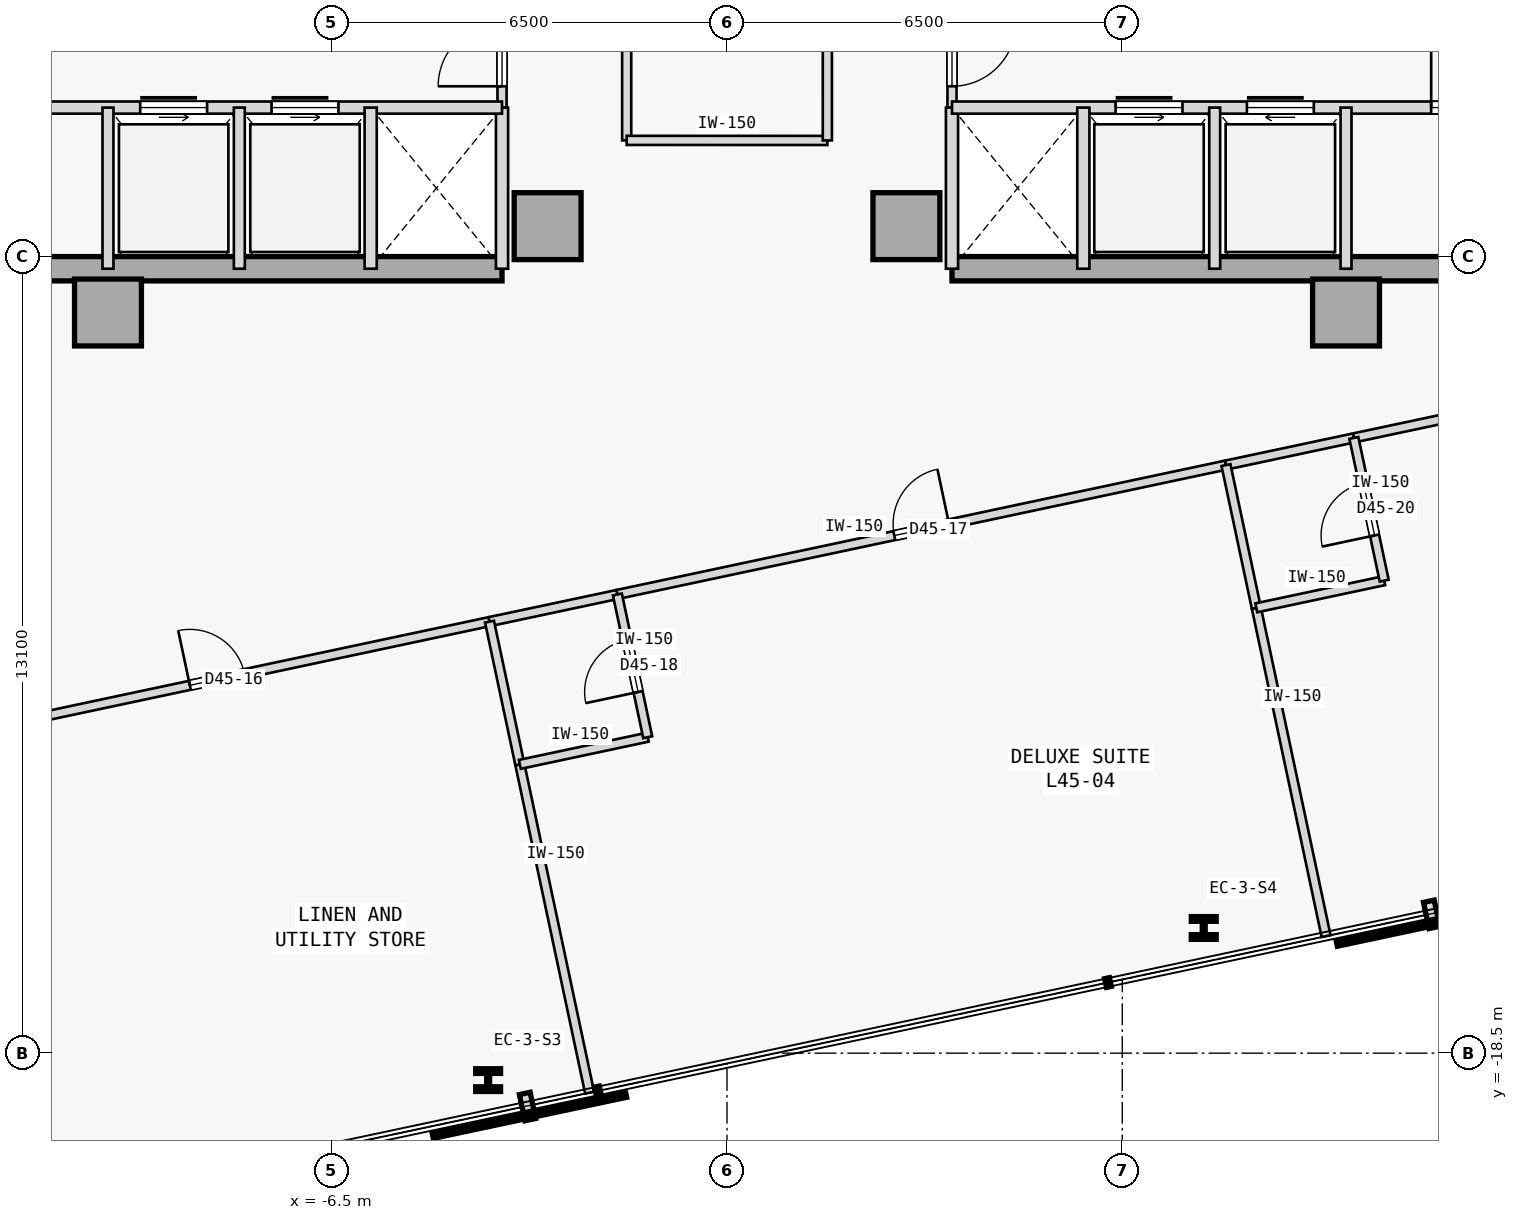
"""IFC4 building model, lengths in metres.
Left out: names, types, materials, properties, quantities, classifications, styles, units other than length and angle.
Written with IfcOpenShell. Run it as: python <this file> out.ifc"""

import sys

from ifc_helpers import new_model, si_unit, direction, frame, frame_2d, origin, origin_2d, place, context, subcontext, project, spatial, rectangle, i_section, extrude, element, fill, save


model = new_model("IFC4")
c1 = context("Model", 3, precision=1e-05, world=origin(), true_north=direction((0.0, 1.0)))
c2 = subcontext(c1, "Body", "Model", "MODEL_VIEW")
j1 = project(units=[si_unit("LENGTHUNIT", "METRE"), si_unit("PLANEANGLEUNIT", "RADIAN")], contexts=[c1])
p1 = place(None, origin())
s1 = spatial("IfcSite", under=j1, at=p1, CompositionType="ELEMENT")
p2 = place(p1, origin())
s2 = spatial("IfcBuilding", under=s1, at=p2, CompositionType="ELEMENT")
p3 = place(p2, frame((0.0, 0.0, 175.2)))
s3 = spatial("IfcBuildingStorey", under=s2, at=p3, CompositionType="ELEMENT", Elevation=175.2)
for number, where, z_axis, x_axis in (
    (1, (-10.18, -6.32, 0.0), (0.0, 0.0, 1.0), (1.0, 0.0, 0.0)),
    (2, (-2.95, -4.9, 0.0), (0.0, 0.0, 1.0), (1.0, 0.0, 0.0)),
    (3, (10.18, -6.32, 0.0), (0.0, 0.0, 1.0), (1.0, 0.0, 0.0)),
    (4, (2.95, -4.9, 0.0), (0.0, 0.0, 1.0), (1.0, 0.0, 0.0)),
):
    element("IfcColumn", number, at=place(p3, frame(where, z_axis=z_axis, x_axis=x_axis)), inside=s3, PredefinedType="COLUMN", context=c2, shape_type="SweptSolid", body=[
        extrude(rectangle(XDim=1.1, YDim=1.1, at=origin_2d()), origin(), (0.0, 0.0, 1.0), 3.4),
    ])
for number, where, z_axis, x_axis in (
    (5, (-14.56, -5.6, 0.0), (0.0, 0.0, 1.0), (1.0, 0.0, 0.0)),
    (6, (3.7, -5.6, 0.0), (0.0, 0.0, 1.0), (1.0, 0.0, 0.0)),
):
    element("IfcWall", number, at=place(p3, frame(where, z_axis=z_axis, x_axis=x_axis)), inside=s3, PredefinedType="SHEAR", context=c2, shape_type="SweptSolid", body=[
        extrude(rectangle(XDim=10.86, YDim=0.4, at=frame_2d((5.43, 0.0))), origin(), (0.0, 0.0, 1.0), 3.175),
    ])
for number, where, z_axis, x_axis in (
    (7, (-3.928, -18.943, 0.0), (0.0, 0.0, 1.0), (1.0, 0.0, 0.0)),
    (8, (7.84, -16.441, 0.0), (0.0, 0.0, 1.0), (1.0, 0.0, 0.0)),
):
    element("IfcColumn", number, at=place(p3, frame(where, z_axis=z_axis, x_axis=x_axis)), inside=s3, PredefinedType="COLUMN", context=c2, shape_type="SweptSolid", body=[
        extrude(i_section(OverallWidth=0.409, OverallDepth=0.374, WebThickness=0.048, FlangeThickness=0.077, FilletRadius=0.015, at=origin_2d()), origin(), (0.0, 0.0, 1.0), 3.4),
    ])
p4 = place(p3, frame((-3.7, -2.95, 0.0), z_axis=(0.0, 0.0, 1.0), x_axis=(0.0, 1.0, 0.0)))
e9 = element("IfcWall", 9, at=p4, inside=s3, PredefinedType="PARTITIONING", context=c2, shape_type="SweptSolid", body=[
    extrude(rectangle(XDim=1.8, YDim=0.15, at=frame_2d((0.9, 0.0))), origin(), (0.0, 0.0, 1.0), 3.175),
])
p5 = place(p4, frame((0.35, 0.0, 0.0)))
e10 = element("IfcOpeningElement", 10, at=p5, cuts=e9, PredefinedType="OPENING", context=c2, shape_type="SweptSolid", body=[
    extrude(rectangle(XDim=1.05, YDim=2.18, at=frame_2d((0.525, 1.09))), frame((0.0, 0.085, 0.0), z_axis=(0.0, -1.0, 0.0), x_axis=(1.0, 0.0, 0.0)), (0.0, 0.0, 1.0), 0.17),
])
p6 = place(p3, frame((-3.7, -5.6, 0.0), z_axis=(0.0, 0.0, 1.0), x_axis=(0.0, 1.0, 0.0)))
e11 = element("IfcWall", 11, at=p6, inside=s3, PredefinedType="STANDARD", context=c2, shape_type="SweptSolid", body=[
    extrude(rectangle(XDim=2.65, YDim=0.2, at=frame_2d((1.325, 0.0))), origin(), (0.0, 0.0, 1.0), 3.175),
])
p7 = place(p3, frame((-14.5, -2.95, 0.0), z_axis=(0.0, 0.0, 1.0), x_axis=(1.0, 0.0, 0.0)))
e12 = element("IfcWall", 12, at=p7, inside=s3, PredefinedType="STANDARD", context=c2, shape_type="SweptSolid", body=[
    extrude(rectangle(XDim=10.8, YDim=0.2, at=frame_2d((5.4, 0.0))), origin(), (0.0, 0.0, 1.0), 3.175),
])
p8 = place(p7, frame((4.85, 0.0, 0.0)))
e13 = element("IfcOpeningElement", 13, at=p8, cuts=e12, PredefinedType="OPENING", context=c2, shape_type="SweptSolid", body=[
    extrude(rectangle(XDim=1.1, YDim=2.15, at=frame_2d((0.55, 1.075))), frame((0.0, 0.11, 0.0), z_axis=(0.0, -1.0, 0.0), x_axis=(1.0, 0.0, 0.0)), (0.0, 0.0, 1.0), 0.22),
])
p9 = place(p7, frame((7.01, 0.0, 0.0)))
e14 = element("IfcOpeningElement", 14, at=p9, cuts=e12, PredefinedType="OPENING", context=c2, shape_type="SweptSolid", body=[
    extrude(rectangle(XDim=1.1, YDim=2.15, at=frame_2d((0.55, 1.075))), frame((0.0, 0.11, 0.0), z_axis=(0.0, -1.0, 0.0), x_axis=(1.0, 0.0, 0.0)), (0.0, 0.0, 1.0), 0.22),
])
p10 = place(p7, frame((1.4, 0.0, 0.0)))
e15 = element("IfcOpeningElement", 15, at=p10, cuts=e12, PredefinedType="OPENING", context=c2, shape_type="SweptSolid", body=[
    extrude(rectangle(XDim=0.95, YDim=2.15, at=frame_2d((0.475, 1.075))), frame((0.0, 0.11, 0.0), z_axis=(0.0, -1.0, 0.0), x_axis=(1.0, 0.0, 0.0)), (0.0, 0.0, 1.0), 0.22),
])
p11 = place(p3, frame((-5.86, -5.6, 0.0), z_axis=(0.0, 0.0, 1.0), x_axis=(0.0, 1.0, 0.0)))
e16 = element("IfcWall", 16, at=p11, inside=s3, PredefinedType="STANDARD", context=c2, shape_type="SweptSolid", body=[
    extrude(rectangle(XDim=2.65, YDim=0.2, at=frame_2d((1.325, 0.0))), origin(), (0.0, 0.0, 1.0), 3.175),
])
for number, where, z_axis, x_axis in (
    (17, (-10.18, -5.6, 0.0), (0.0, 0.0, 1.0), (0.0, 1.0, 0.0)),
    (18, (-8.02, -5.6, 0.0), (0.0, 0.0, 1.0), (0.0, 1.0, 0.0)),
):
    element("IfcWall", number, at=place(p3, frame(where, z_axis=z_axis, x_axis=x_axis)), inside=s3, PredefinedType="STANDARD", context=c2, shape_type="SweptSolid", body=[
        extrude(rectangle(XDim=2.65, YDim=0.18, at=frame_2d((1.325, 0.0))), origin(), (0.0, 0.0, 1.0), 3.175),
    ])
p12 = place(p3, frame((3.7, -2.95, 0.0), z_axis=(0.0, 0.0, 1.0), x_axis=(0.0, 1.0, 0.0)))
e19 = element("IfcWall", 19, at=p12, inside=s3, PredefinedType="PARTITIONING", context=c2, shape_type="SweptSolid", body=[
    extrude(rectangle(XDim=1.8, YDim=0.15, at=frame_2d((0.9, 0.0))), origin(), (0.0, 0.0, 1.0), 3.175),
])
p13 = place(p12, frame((0.35, 0.0, 0.0)))
e20 = element("IfcOpeningElement", 20, at=p13, cuts=e19, PredefinedType="OPENING", context=c2, shape_type="SweptSolid", body=[
    extrude(rectangle(XDim=1.05, YDim=2.18, at=frame_2d((0.525, 1.09))), frame((0.0, 0.085, 0.0), z_axis=(0.0, -1.0, 0.0), x_axis=(1.0, 0.0, 0.0)), (0.0, 0.0, 1.0), 0.17),
])
p14 = place(p3, frame((3.7, -5.6, 0.0), z_axis=(0.0, 0.0, 1.0), x_axis=(0.0, 1.0, 0.0)))
e21 = element("IfcWall", 21, at=p14, inside=s3, PredefinedType="STANDARD", context=c2, shape_type="SweptSolid", body=[
    extrude(rectangle(XDim=2.65, YDim=0.2, at=frame_2d((1.325, 0.0))), origin(), (0.0, 0.0, 1.0), 3.175),
])
p15 = place(p3, frame((3.7, -2.95, 0.0), z_axis=(0.0, 0.0, 1.0), x_axis=(1.0, 0.0, 0.0)))
e22 = element("IfcWall", 22, at=p15, inside=s3, PredefinedType="STANDARD", context=c2, shape_type="SweptSolid", body=[
    extrude(rectangle(XDim=10.8, YDim=0.2, at=frame_2d((5.4, 0.0))), origin(), (0.0, 0.0, 1.0), 3.175),
])
p16 = place(p15, frame((2.69, 0.0, 0.0)))
e23 = element("IfcOpeningElement", 23, at=p16, cuts=e22, PredefinedType="OPENING", context=c2, shape_type="SweptSolid", body=[
    extrude(rectangle(XDim=1.1, YDim=2.15, at=frame_2d((0.55, 1.075))), frame((0.0, 0.11, 0.0), z_axis=(0.0, -1.0, 0.0), x_axis=(1.0, 0.0, 0.0)), (0.0, 0.0, 1.0), 0.22),
])
p17 = place(p15, frame((4.85, 0.0, 0.0)))
e24 = element("IfcOpeningElement", 24, at=p17, cuts=e22, PredefinedType="OPENING", context=c2, shape_type="SweptSolid", body=[
    extrude(rectangle(XDim=1.1, YDim=2.15, at=frame_2d((0.55, 1.075))), frame((0.0, 0.11, 0.0), z_axis=(0.0, -1.0, 0.0), x_axis=(1.0, 0.0, 0.0)), (0.0, 0.0, 1.0), 0.22),
])
p18 = place(p15, frame((7.88, 0.0, 0.0)))
e25 = element("IfcOpeningElement", 25, at=p18, cuts=e22, PredefinedType="OPENING", context=c2, shape_type="SweptSolid", body=[
    extrude(rectangle(XDim=0.95, YDim=2.15, at=frame_2d((0.475, 1.075))), frame((0.0, 0.11, 0.0), z_axis=(0.0, -1.0, 0.0), x_axis=(1.0, 0.0, 0.0)), (0.0, 0.0, 1.0), 0.22),
])
p19 = place(p3, frame((5.86, -5.6, 0.0), z_axis=(0.0, 0.0, 1.0), x_axis=(0.0, 1.0, 0.0)))
e26 = element("IfcWall", 26, at=p19, inside=s3, PredefinedType="STANDARD", context=c2, shape_type="SweptSolid", body=[
    extrude(rectangle(XDim=2.65, YDim=0.2, at=frame_2d((1.325, 0.0))), origin(), (0.0, 0.0, 1.0), 3.175),
])
for number, where, z_axis, x_axis in (
    (27, (10.18, -5.6, 0.0), (0.0, 0.0, 1.0), (0.0, 1.0, 0.0)),
    (28, (8.02, -5.6, 0.0), (0.0, 0.0, 1.0), (0.0, 1.0, 0.0)),
):
    element("IfcWall", number, at=place(p3, frame(where, z_axis=z_axis, x_axis=x_axis)), inside=s3, PredefinedType="STANDARD", context=c2, shape_type="SweptSolid", body=[
        extrude(rectangle(XDim=2.65, YDim=0.18, at=frame_2d((1.325, 0.0))), origin(), (0.0, 0.0, 1.0), 3.175),
    ])
p20 = place(p3, frame((-1.65, -3.49, 0.0), z_axis=(0.0, 0.0, 1.0), x_axis=(-3.4979712e-05, 0.999999999388, 0.0)))
e29 = element("IfcWall", 29, at=p20, inside=s3, PredefinedType="PARTITIONING", context=c2, shape_type="SweptSolid", body=[
    extrude(rectangle(XDim=6.979, YDim=0.15, at=frame_2d((3.49, 0.0))), origin(), (0.0, 0.0, 1.0), 3.175),
])
p21 = place(p3, frame((-1.65, -3.49, 0.0), z_axis=(0.0, 0.0, 1.0), x_axis=(0.999999975374, -0.000221926315, 0.0)))
e30 = element("IfcWall", 30, at=p21, inside=s3, PredefinedType="PARTITIONING", context=c2, shape_type="SweptSolid", body=[
    extrude(rectangle(XDim=3.3, YDim=0.15, at=frame_2d((1.65, 0.0))), origin(), (0.0, 0.0, 1.0), 3.175),
])
p22 = place(p3, frame((1.65, -3.49, 0.0), z_axis=(0.0, 0.0, 1.0), x_axis=(-6.9952083e-05, 0.999999997553, 0.0)))
e31 = element("IfcWall", 31, at=p22, inside=s3, PredefinedType="PARTITIONING", context=c2, shape_type="SweptSolid", body=[
    extrude(rectangle(XDim=6.98, YDim=0.15, at=frame_2d((3.49, 0.0))), origin(), (0.0, 0.0, 1.0), 3.175),
])
p23 = place(p22, frame((3.015, 0.0, 0.0)))
e32 = element("IfcOpeningElement", 32, at=p23, cuts=e31, PredefinedType="OPENING", context=c2, shape_type="SweptSolid", body=[
    extrude(rectangle(XDim=0.95, YDim=2.15, at=frame_2d((0.475, 1.075))), frame((0.0, 0.085, 0.0), z_axis=(0.0, -1.0, 0.0), x_axis=(1.0, 0.0, 0.0)), (0.0, 0.0, 1.0), 0.17),
])
p24 = place(p3, frame((-12.862, -13.307, 0.0), z_axis=(0.0, 0.0, 1.0), x_axis=(0.978149904805, 0.207900850719, 0.0)))
e33 = element("IfcWall", 33, at=p24, inside=s3, PredefinedType="PARTITIONING", context=c2, shape_type="SweptSolid", body=[
    extrude(rectangle(XDim=9.156, YDim=0.15, at=frame_2d((4.578, 0.0))), origin(), (0.0, 0.0, 1.0), 3.175),
])
p25 = place(p24, frame((4.118, 0.0, 0.0)))
e34 = element("IfcOpeningElement", 34, at=p25, cuts=e33, PredefinedType="OPENING", context=c2, shape_type="SweptSolid", body=[
    extrude(rectangle(XDim=0.92, YDim=2.15, at=frame_2d((0.46, 1.075))), frame((0.0, 0.085, 0.0), z_axis=(0.0, -1.0, 0.0), x_axis=(1.0, 0.0, 0.0)), (0.0, 0.0, 1.0), 0.17),
])
p26 = place(p3, frame((-1.803, -10.957, 0.0), z_axis=(0.0, 0.0, 1.0), x_axis=(0.978145386425, 0.207922108048, 0.0)))
e35 = element("IfcWall", 35, at=p26, inside=s3, PredefinedType="PARTITIONING", context=c2, shape_type="SweptSolid", body=[
    extrude(rectangle(XDim=10.232, YDim=0.15, at=frame_2d((5.116, 0.0))), origin(), (0.0, 0.0, 1.0), 3.175),
])
p27 = place(p26, frame((4.656, 0.0, 0.0)))
e36 = element("IfcOpeningElement", 36, at=p27, cuts=e35, PredefinedType="OPENING", context=c2, shape_type="SweptSolid", body=[
    extrude(rectangle(XDim=0.92, YDim=2.15, at=frame_2d((0.46, 1.075))), frame((0.0, 0.085, 0.0), z_axis=(0.0, -1.0, 0.0), x_axis=(1.0, 0.0, 0.0)), (0.0, 0.0, 1.0), 0.17),
])
p28 = place(p3, frame((-3.906, -11.404, 0.0), z_axis=(0.0, 0.0, 1.0), x_axis=(0.978146728319, 0.207915795165, 0.0)))
e37 = element("IfcWall", 37, at=p28, inside=s3, PredefinedType="PARTITIONING", context=c2, shape_type="SweptSolid", body=[
    extrude(rectangle(XDim=2.15, YDim=0.15, at=frame_2d((1.075, 0.0))), origin(), (0.0, 0.0, 1.0), 3.175),
])
p29 = place(p3, frame((10.309, -8.382, 0.0), z_axis=(0.0, 0.0, 1.0), x_axis=(0.978149817889, 0.207901259648, 0.0)))
e38 = element("IfcWall", 38, at=p29, inside=s3, PredefinedType="PARTITIONING", context=c2, shape_type="SweptSolid", body=[
    extrude(rectangle(XDim=7.007, YDim=0.15, at=frame_2d((3.503, 0.0))), origin(), (0.0, 0.0, 1.0), 3.175),
])
p30 = place(p29, frame((3.043, 0.0, 0.0)))
e39 = element("IfcOpeningElement", 39, at=p30, cuts=e38, PredefinedType="OPENING", context=c2, shape_type="SweptSolid", body=[
    extrude(rectangle(XDim=0.92, YDim=2.15, at=frame_2d((0.46, 1.075))), frame((0.0, 0.085, 0.0), z_axis=(0.0, -1.0, 0.0), x_axis=(1.0, 0.0, 0.0)), (0.0, 0.0, 1.0), 0.17),
])
p31 = place(p3, frame((8.206, -8.829, 0.0), z_axis=(0.0, 0.0, 1.0), x_axis=(0.978146728319, 0.207915795165, 0.0)))
e40 = element("IfcWall", 40, at=p31, inside=s3, PredefinedType="PARTITIONING", context=c2, shape_type="SweptSolid", body=[
    extrude(rectangle(XDim=2.15, YDim=0.15, at=frame_2d((1.075, 0.0))), origin(), (0.0, 0.0, 1.0), 3.175),
])
p32 = place(p3, frame((-2.259, -19.15, 0.0), z_axis=(0.0, 0.0, 1.0), x_axis=(-0.20791588359, 0.978146709523, 0.0)))
e41 = element("IfcWall", 41, at=p32, inside=s3, PredefinedType="PARTITIONING", context=c2, shape_type="SweptSolid", body=[
    extrude(rectangle(XDim=5.52, YDim=0.15, at=frame_2d((2.76, 0.0))), origin(), (0.0, 0.0, 1.0), 3.175),
])
p33 = place(p3, frame((-3.407, -13.751, 0.0), z_axis=(0.0, 0.0, 1.0), x_axis=(-0.207840504985, 0.978162729042, 0.0)))
e42 = element("IfcWall", 42, at=p33, inside=s3, PredefinedType="PARTITIONING", context=c2, shape_type="SweptSolid", body=[
    extrude(rectangle(XDim=2.4, YDim=0.15, at=frame_2d((1.2, 0.0))), origin(), (0.0, 0.0, 1.0), 3.175),
])
p34 = place(p3, frame((-3.407, -13.751, 0.0), z_axis=(0.0, 0.0, 1.0), x_axis=(0.978151636287, 0.207892704126, 0.0)))
e43 = element("IfcWall", 43, at=p34, inside=s3, PredefinedType="PARTITIONING", context=c2, shape_type="SweptSolid", body=[
    extrude(rectangle(XDim=2.15, YDim=0.15, at=frame_2d((1.075, 0.0))), origin(), (0.0, 0.0, 1.0), 3.175),
])
p35 = place(p3, frame((-1.304, -13.304, 0.0), z_axis=(0.0, 0.0, 1.0), x_axis=(-0.207937840262, 0.978142042133, 0.0)))
e44 = element("IfcWall", 44, at=p35, inside=s3, PredefinedType="PARTITIONING", context=c2, shape_type="SweptSolid", body=[
    extrude(rectangle(XDim=2.4, YDim=0.15, at=frame_2d((1.2, 0.0))), origin(), (0.0, 0.0, 1.0), 3.175),
])
p36 = place(p35, frame((0.76, 0.0, 0.0)))
e45 = element("IfcOpeningElement", 45, at=p36, cuts=e44, PredefinedType="OPENING", context=c2, shape_type="SweptSolid", body=[
    extrude(rectangle(XDim=0.88, YDim=2.15, at=frame_2d((0.44, 1.075))), frame((0.0, 0.085, 0.0), z_axis=(0.0, -1.0, 0.0), x_axis=(1.0, 0.0, 0.0)), (0.0, 0.0, 1.0), 0.17),
])
p37 = place(p3, frame((9.852, -16.576, 0.0), z_axis=(0.0, 0.0, 1.0), x_axis=(-0.20792487872, 0.978144797466, 0.0)))
e46 = element("IfcWall", 46, at=p37, inside=s3, PredefinedType="PARTITIONING", context=c2, shape_type="SweptSolid", body=[
    extrude(rectangle(XDim=5.52, YDim=0.15, at=frame_2d((2.76, 0.0))), origin(), (0.0, 0.0, 1.0), 3.175),
])
p38 = place(p3, frame((8.705, -11.177, 0.0), z_axis=(0.0, 0.0, 1.0), x_axis=(-0.207917150959, 0.978146440129, 0.0)))
e47 = element("IfcWall", 47, at=p38, inside=s3, PredefinedType="PARTITIONING", context=c2, shape_type="SweptSolid", body=[
    extrude(rectangle(XDim=2.4, YDim=0.15, at=frame_2d((1.2, 0.0))), origin(), (0.0, 0.0, 1.0), 3.175),
])
p39 = place(p3, frame((8.705, -11.177, 0.0), z_axis=(0.0, 0.0, 1.0), x_axis=(0.978123629285, 0.208024435669, 0.0)))
e48 = element("IfcWall", 48, at=p39, inside=s3, PredefinedType="PARTITIONING", context=c2, shape_type="SweptSolid", body=[
    extrude(rectangle(XDim=2.15, YDim=0.15, at=frame_2d((1.075, 0.0))), origin(), (0.0, 0.0, 1.0), 3.175),
])
p40 = place(p3, frame((10.808, -10.729, 0.0), z_axis=(0.0, 0.0, 1.0), x_axis=(-0.207937840262, 0.978142042133, 0.0)))
e49 = element("IfcWall", 49, at=p40, inside=s3, PredefinedType="PARTITIONING", context=c2, shape_type="SweptSolid", body=[
    extrude(rectangle(XDim=2.4, YDim=0.15, at=frame_2d((1.2, 0.0))), origin(), (0.0, 0.0, 1.0), 3.175),
])
p41 = place(p40, frame((0.76, 0.0, 0.0)))
e50 = element("IfcOpeningElement", 50, at=p41, cuts=e49, PredefinedType="OPENING", context=c2, shape_type="SweptSolid", body=[
    extrude(rectangle(XDim=0.88, YDim=2.15, at=frame_2d((0.44, 1.075))), frame((0.0, 0.085, 0.0), z_axis=(0.0, -1.0, 0.0), x_axis=(1.0, 0.0, 0.0)), (0.0, 0.0, 1.0), 0.17),
])
p42 = place(p5, origin())
e51 = element("IfcDoor", 51, at=p42, inside=s3, OperationType="SINGLE_SWING_LEFT", PredefinedType="DOOR", context=c2, shape_type="SweptSolid", body=[
    extrude(rectangle(XDim=1.05, YDim=2.18, at=frame_2d((0.525, 1.09))), frame((0.0, 0.025, 0.0), z_axis=(0.0, -1.0, 0.0), x_axis=(1.0, 0.0, 0.0)), (0.0, 0.0, 1.0), 0.05),
])
fill(e10, e51)
p43 = place(p8, origin())
e52 = element("IfcDoor", 52, at=p43, inside=s3, OperationType="SLIDING_TO_LEFT", PredefinedType="DOOR", context=c2, shape_type="SweptSolid", body=[
    extrude(rectangle(XDim=1.1, YDim=2.15, at=frame_2d((0.55, 1.075))), frame((0.0, 0.025, 0.0), z_axis=(0.0, -1.0, 0.0), x_axis=(1.0, 0.0, 0.0)), (0.0, 0.0, 1.0), 0.05),
])
fill(e13, e52)
p44 = place(p9, origin())
e53 = element("IfcDoor", 53, at=p44, inside=s3, OperationType="SLIDING_TO_LEFT", PredefinedType="DOOR", context=c2, shape_type="SweptSolid", body=[
    extrude(rectangle(XDim=1.1, YDim=2.15, at=frame_2d((0.55, 1.075))), frame((0.0, 0.025, 0.0), z_axis=(0.0, -1.0, 0.0), x_axis=(1.0, 0.0, 0.0)), (0.0, 0.0, 1.0), 0.05),
])
fill(e14, e53)
p45 = place(p13, frame((1.05, 0.0, 0.0), z_axis=(0.0, 0.0, 1.0), x_axis=(-1.0, 0.0, 0.0)))
e54 = element("IfcDoor", 54, at=p45, inside=s3, OperationType="SINGLE_SWING_RIGHT", PredefinedType="DOOR", context=c2, shape_type="SweptSolid", body=[
    extrude(rectangle(XDim=1.05, YDim=2.18, at=frame_2d((0.525, 1.09))), frame((0.0, 0.025, 0.0), z_axis=(0.0, -1.0, 0.0), x_axis=(1.0, 0.0, 0.0)), (0.0, 0.0, 1.0), 0.05),
])
fill(e20, e54)
p46 = place(p16, origin())
e55 = element("IfcDoor", 55, at=p46, inside=s3, OperationType="SLIDING_TO_LEFT", PredefinedType="DOOR", context=c2, shape_type="SweptSolid", body=[
    extrude(rectangle(XDim=1.1, YDim=2.15, at=frame_2d((0.55, 1.075))), frame((0.0, 0.025, 0.0), z_axis=(0.0, -1.0, 0.0), x_axis=(1.0, 0.0, 0.0)), (0.0, 0.0, 1.0), 0.05),
])
fill(e23, e55)
p47 = place(p17, origin())
e56 = element("IfcDoor", 56, at=p47, inside=s3, OperationType="SLIDING_TO_RIGHT", PredefinedType="DOOR", context=c2, shape_type="SweptSolid", body=[
    extrude(rectangle(XDim=1.1, YDim=2.15, at=frame_2d((0.55, 1.075))), frame((0.0, 0.025, 0.0), z_axis=(0.0, -1.0, 0.0), x_axis=(1.0, 0.0, 0.0)), (0.0, 0.0, 1.0), 0.05),
])
fill(e24, e56)
p48 = place(p18, origin())
e57 = element("IfcDoor", 57, at=p48, inside=s3, OperationType="SINGLE_SWING_LEFT", PredefinedType="DOOR", context=c2, shape_type="SweptSolid", body=[
    extrude(rectangle(XDim=0.95, YDim=2.15, at=frame_2d((0.475, 1.075))), frame((0.0, 0.025, 0.0), z_axis=(0.0, -1.0, 0.0), x_axis=(1.0, 0.0, 0.0)), (0.0, 0.0, 1.0), 0.05),
])
fill(e25, e57)
p49 = place(p25, origin())
e58 = element("IfcDoor", 58, at=p49, inside=s3, OperationType="SINGLE_SWING_LEFT", PredefinedType="DOOR", context=c2, shape_type="SweptSolid", body=[
    extrude(rectangle(XDim=0.92, YDim=2.15, at=frame_2d((0.46, 1.075))), frame((0.0, 0.025, 0.0), z_axis=(0.0, -1.0, 0.0), x_axis=(1.0, 0.0, 0.0)), (0.0, 0.0, 1.0), 0.05),
])
fill(e34, e58)
p50 = place(p27, origin())
e59 = element("IfcDoor", 59, at=p50, inside=s3, OperationType="SINGLE_SWING_RIGHT", PredefinedType="DOOR", context=c2, shape_type="SweptSolid", body=[
    extrude(rectangle(XDim=0.92, YDim=2.15, at=frame_2d((0.46, 1.075))), frame((0.0, 0.025, 0.0), z_axis=(0.0, -1.0, 0.0), x_axis=(1.0, 0.0, 0.0)), (0.0, 0.0, 1.0), 0.05),
])
fill(e36, e59)
p51 = place(p36, origin())
e60 = element("IfcDoor", 60, at=p51, inside=s3, OperationType="SINGLE_SWING_LEFT", PredefinedType="DOOR", context=c2, shape_type="SweptSolid", body=[
    extrude(rectangle(XDim=0.88, YDim=2.15, at=frame_2d((0.44, 1.075))), frame((0.0, 0.025, 0.0), z_axis=(0.0, -1.0, 0.0), x_axis=(1.0, 0.0, 0.0)), (0.0, 0.0, 1.0), 0.05),
])
fill(e45, e60)
p52 = place(p41, origin())
e61 = element("IfcDoor", 61, at=p52, inside=s3, OperationType="SINGLE_SWING_LEFT", PredefinedType="DOOR", context=c2, shape_type="SweptSolid", body=[
    extrude(rectangle(XDim=0.88, YDim=2.15, at=frame_2d((0.44, 1.075))), frame((0.0, 0.025, 0.0), z_axis=(0.0, -1.0, 0.0), x_axis=(1.0, 0.0, 0.0)), (0.0, 0.0, 1.0), 0.05),
])
fill(e50, e61)
save(model, sys.argv[1])
